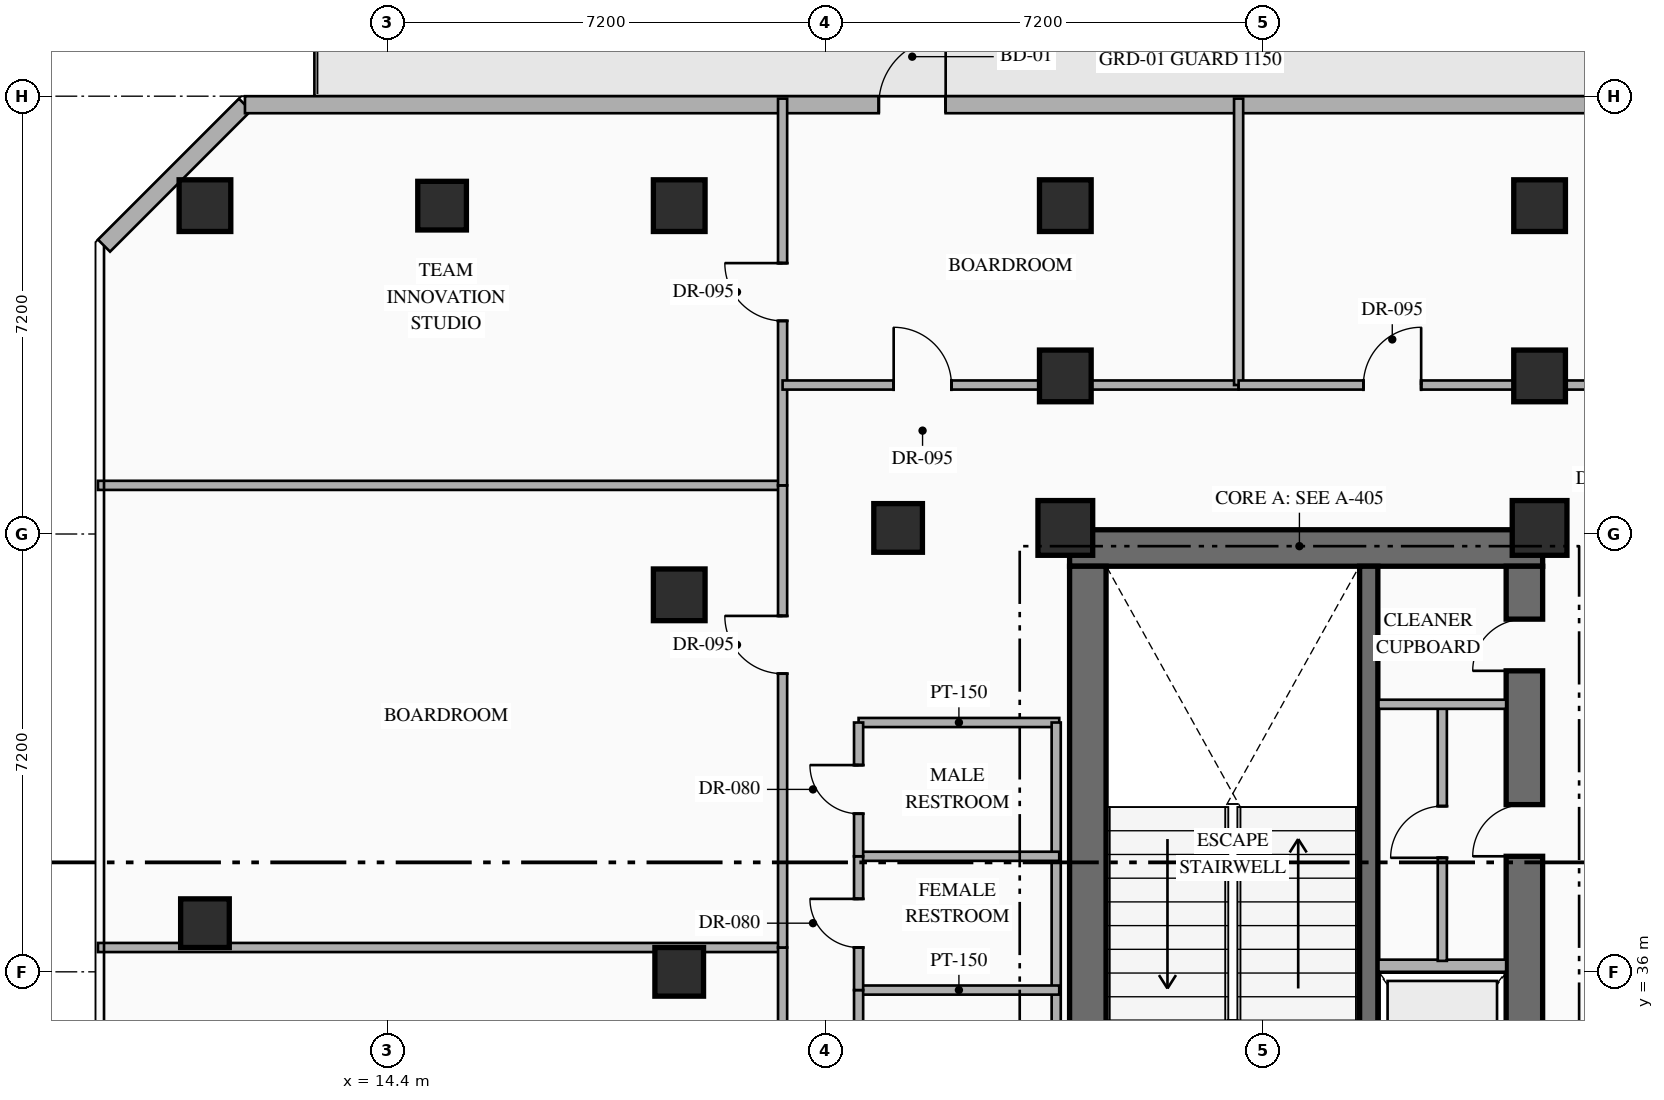
"""IFC4 building model, lengths in metres.
Left out: names, types, materials, properties, quantities, classifications, styles, units other than length and angle.
Written with IfcOpenShell. Run it as: python <this file> out.ifc"""

import sys

from ifc_helpers import new_model, si_unit, direction, frame, frame_2d, origin, origin_2d, place, context, subcontext, project, spatial, rectangle, hollow_rectangle, extrude, element, fill, save


model = new_model("IFC4")
c1 = context("Model", 3, precision=1e-05, world=origin(), true_north=direction((0.0, 1.0)))
c2 = subcontext(c1, "Body", "Model", "MODEL_VIEW")
j1 = project(units=[si_unit("LENGTHUNIT", "METRE"), si_unit("PLANEANGLEUNIT", "RADIAN")], contexts=[c1])
p1 = place(None, origin())
s1 = spatial("IfcSite", under=j1, at=p1, CompositionType="ELEMENT")
p2 = place(p1, origin())
s2 = spatial("IfcBuilding", under=s1, at=p2, CompositionType="ELEMENT")
p3 = place(p2, frame((0.0, 0.0, 142.05)))
s3 = spatial("IfcBuildingStorey", under=s2, at=p3, CompositionType="ELEMENT", Elevation=142.05)
p4 = place(p3, frame((25.62, 42.97, 0.0), z_axis=(0.0, 0.0, 1.0), x_axis=(1.0, 0.0, 0.0)))
e1 = element("IfcWall", 1, at=p4, inside=s3, PredefinedType="SHEAR", context=c2, shape_type="SweptSolid", body=[
    extrude(rectangle(XDim=7.78, YDim=0.6, at=frame_2d((3.89, 0.0))), origin(), (0.0, 0.0, 1.0), 3.6),
])
p5 = place(p3, frame((25.92, 33.19, 0.0), z_axis=(0.0, 0.0, 1.0), x_axis=(0.0, 1.0, 0.0)))
e2 = element("IfcWall", 2, at=p5, inside=s3, PredefinedType="SHEAR", context=c2, shape_type="SweptSolid", body=[
    extrude(rectangle(XDim=9.48, YDim=0.6, at=frame_2d((4.74, 0.0))), origin(), (0.0, 0.0, 1.0), 3.6),
])
p6 = place(p3, frame((33.1, 33.19, 0.0), z_axis=(0.0, 0.0, 1.0), x_axis=(0.0, 1.0, 0.0)))
e3 = element("IfcWall", 3, at=p6, inside=s3, PredefinedType="SHEAR", context=c2, shape_type="SweptSolid", body=[
    extrude(rectangle(XDim=9.48, YDim=0.6, at=frame_2d((4.74, 0.0))), origin(), (0.0, 0.0, 1.0), 3.6),
])
p7 = place(p6, frame((4.71, 0.0, 0.0)))
e4 = element("IfcOpeningElement", 4, at=p7, cuts=e3, PredefinedType="OPENING", context=c2, shape_type="SweptSolid", body=[
    extrude(rectangle(XDim=0.85, YDim=2.08, at=frame_2d((0.425, 1.04))), frame((0.0, 0.31, 0.0), z_axis=(0.0, -1.0, 0.0), x_axis=(1.0, 0.0, 0.0)), (0.0, 0.0, 1.0), 0.62),
])
p8 = place(p6, frame((7.76, 0.0, 0.0)))
e5 = element("IfcOpeningElement", 5, at=p8, cuts=e3, PredefinedType="OPENING", context=c2, shape_type="SweptSolid", body=[
    extrude(rectangle(XDim=0.85, YDim=2.08, at=frame_2d((0.425, 1.04))), frame((0.0, 0.31, 0.0), z_axis=(0.0, -1.0, 0.0), x_axis=(1.0, 0.0, 0.0)), (0.0, 0.0, 1.0), 0.62),
])
p9 = place(p3, frame((30.54, 33.19, 0.0), z_axis=(0.0, 0.0, 1.0), x_axis=(0.0, 1.0, 0.0)))
e6 = element("IfcWall", 6, at=p9, inside=s3, PredefinedType="SHEAR", context=c2, shape_type="SweptSolid", body=[
    extrude(rectangle(XDim=9.48, YDim=0.3, at=frame_2d((4.74, 0.0))), origin(), (0.0, 0.0, 1.0), 3.6),
])
for number, where, z_axis, x_axis in (
    (7, (25.55, 43.3, 0.0), (0.0, 0.0, 1.0), (1.0, 0.0, 0.0)),
    (8, (33.35, 43.3, 0.0), (0.0, 0.0, 1.0), (1.0, 0.0, 0.0)),
):
    element("IfcColumn", number, at=place(p3, frame(where, z_axis=z_axis, x_axis=x_axis)), inside=s3, PredefinedType="COLUMN", context=c2, shape_type="SweptSolid", body=[
        extrude(rectangle(XDim=0.9, YDim=0.9, at=origin_2d()), origin(), (0.0, 0.0, 1.0), 3.6),
    ])
for number, where, z_axis, x_axis in (
    (9, (25.55, 45.8, 0.0), (0.0, 0.0, 1.0), (1.0, 0.0, 0.0)),
    (10, (33.35, 45.8, 0.0), (0.0, 0.0, 1.0), (1.0, 0.0, 0.0)),
    (11, (11.4, 48.6, 0.0), (0.0, 0.0, 1.0), (1.0, 0.0, 0.0)),
    (12, (19.2, 48.6, 0.0), (0.0, 0.0, 1.0), (1.0, 0.0, 0.0)),
    (13, (25.55, 48.6, 0.0), (0.0, 0.0, 1.0), (1.0, 0.0, 0.0)),
    (14, (33.35, 48.6, 0.0), (0.0, 0.0, 1.0), (1.0, 0.0, 0.0)),
    (15, (19.2, 42.2, 0.0), (0.0, 0.0, 1.0), (1.0, 0.0, 0.0)),
):
    element("IfcColumn", number, at=place(p3, frame(where, z_axis=z_axis, x_axis=x_axis)), inside=s3, PredefinedType="COLUMN", context=c2, shape_type="SweptSolid", body=[
        extrude(hollow_rectangle(XDim=0.85, YDim=0.85, WallThickness=0.032, at=origin_2d()), origin(), (0.0, 0.0, 1.0), 3.6),
    ])
for number, where, z_axis, x_axis in (
    (16, (22.8, 43.3, 0.0), (0.0, 0.0, 1.0), (1.0, 0.0, 0.0)),
    (17, (11.4, 36.8, 0.0), (0.0, 0.0, 1.0), (1.0, 0.0, 0.0)),
    (18, (19.2, 36.0, 0.0), (0.0, 0.0, 1.0), (1.0, 0.0, 0.0)),
    (19, (15.3, 48.6, 0.0), (0.0, 0.0, 1.0), (1.0, 0.0, 0.0)),
):
    element("IfcColumn", number, at=place(p3, frame(where, z_axis=z_axis, x_axis=x_axis)), inside=s3, PredefinedType="COLUMN", context=c2, shape_type="SweptSolid", body=[
        extrude(hollow_rectangle(XDim=0.8, YDim=0.8, WallThickness=0.032, at=origin_2d()), origin(), (0.0, 0.0, 1.0), 3.6),
    ])
p10 = place(p3, frame((9.74, 47.942, 0.0), z_axis=(0.0, 0.0, 1.0), x_axis=(0.707106781187, 0.707106781187, 0.0)))
e20 = element("IfcWall", 20, at=p10, inside=s3, PredefinedType="STANDARD", context=c2, shape_type="SweptSolid", body=[
    extrude(rectangle(XDim=3.278, YDim=0.28, at=frame_2d((1.639, 0.0))), origin(), (0.0, 0.0, 1.0), 3.35),
])
p11 = place(p3, frame((12.058, 50.26, 0.0), z_axis=(0.0, 0.0, 1.0), x_axis=(1.0, 0.0, 0.0)))
e21 = element("IfcWall", 21, at=p11, inside=s3, PredefinedType="STANDARD", context=c2, shape_type="SweptSolid", body=[
    extrude(rectangle(XDim=30.484, YDim=0.28, at=frame_2d((15.242, 0.0))), origin(), (0.0, 0.0, 1.0), 3.35),
])
p12 = place(p11, frame((10.424, 0.0, 0.0)))
e22 = element("IfcOpeningElement", 22, at=p12, cuts=e21, PredefinedType="OPENING", context=c2, shape_type="SweptSolid", body=[
    extrude(rectangle(XDim=1.1, YDim=2.2, at=frame_2d((0.55, 1.1))), frame((0.0, 0.15, 0.0), z_axis=(0.0, -1.0, 0.0), x_axis=(1.0, 0.0, 0.0)), (0.0, 0.0, 1.0), 0.3),
])
p13 = place(p3, frame((30.7, 36.1, 0.0), z_axis=(0.0, 0.0, 1.0), x_axis=(1.0, 0.0, 0.0)))
e23 = element("IfcWall", 23, at=p13, inside=s3, PredefinedType="STANDARD", context=c2, shape_type="SweptSolid", body=[
    extrude(rectangle(XDim=2.1, YDim=0.2, at=frame_2d((1.05, 0.0))), origin(), (0.0, 0.0, 1.0), 3.35),
])
p14 = place(p3, frame((31.75, 36.18, 0.0), z_axis=(0.0, 0.0, 1.0), x_axis=(0.0, 1.0, 0.0)))
e24 = element("IfcWall", 24, at=p14, inside=s3, PredefinedType="PARTITIONING", context=c2, shape_type="SweptSolid", body=[
    extrude(rectangle(XDim=4.24, YDim=0.15, at=frame_2d((2.12, 0.0))), origin(), (0.0, 0.0, 1.0), 3.35),
])
p15 = place(p14, frame((1.695, 0.0, 0.0)))
e25 = element("IfcOpeningElement", 25, at=p15, cuts=e24, PredefinedType="OPENING", context=c2, shape_type="SweptSolid", body=[
    extrude(rectangle(XDim=0.85, YDim=2.08, at=frame_2d((0.425, 1.04))), frame((0.0, 0.085, 0.0), z_axis=(0.0, -1.0, 0.0), x_axis=(1.0, 0.0, 0.0)), (0.0, 0.0, 1.0), 0.17),
])
p16 = place(p3, frame((30.7, 40.4, 0.0), z_axis=(0.0, 0.0, 1.0), x_axis=(1.0, 0.0, 0.0)))
e26 = element("IfcWall", 26, at=p16, inside=s3, PredefinedType="PARTITIONING", context=c2, shape_type="SweptSolid", body=[
    extrude(rectangle(XDim=2.1, YDim=0.15, at=frame_2d((1.05, 0.0))), origin(), (0.0, 0.0, 1.0), 3.35),
])
p17 = place(p3, frame((22.15, 40.1, 0.0), z_axis=(0.0, 0.0, 1.0), x_axis=(1.0, 0.0, 0.0)))
e27 = element("IfcWall", 27, at=p17, inside=s3, PredefinedType="PARTITIONING", context=c2, shape_type="SweptSolid", body=[
    extrude(rectangle(XDim=3.3, YDim=0.15, at=frame_2d((1.65, 0.0))), origin(), (0.0, 0.0, 1.0), 3.35),
])
p18 = place(p3, frame((25.4, 33.5, 0.0), z_axis=(0.0, 0.0, 1.0), x_axis=(0.0, 1.0, 0.0)))
e28 = element("IfcWall", 28, at=p18, inside=s3, PredefinedType="PARTITIONING", context=c2, shape_type="SweptSolid", body=[
    extrude(rectangle(XDim=6.6, YDim=0.15, at=frame_2d((3.3, 0.0))), origin(), (0.0, 0.0, 1.0), 3.35),
])
for number, where, z_axis, x_axis in (
    (29, (22.15, 35.7, 0.0), (0.0, 0.0, 1.0), (1.0, 0.0, 0.0)),
    (30, (22.15, 37.9, 0.0), (0.0, 0.0, 1.0), (1.0, 0.0, 0.0)),
):
    element("IfcWall", number, at=place(p3, frame(where, z_axis=z_axis, x_axis=x_axis)), inside=s3, PredefinedType="PARTITIONING", context=c2, shape_type="SweptSolid", body=[
        extrude(rectangle(XDim=3.3, YDim=0.15, at=frame_2d((1.65, 0.0))), origin(), (0.0, 0.0, 1.0), 3.35),
    ])
p19 = place(p3, frame((22.15, 33.5, 0.0), z_axis=(0.0, 0.0, 1.0), x_axis=(0.0, 1.0, 0.0)))
e31 = element("IfcWall", 31, at=p19, inside=s3, PredefinedType="PARTITIONING", context=c2, shape_type="SweptSolid", body=[
    extrude(rectangle(XDim=2.2, YDim=0.15, at=frame_2d((1.1, 0.0))), origin(), (0.0, 0.0, 1.0), 3.35),
])
p20 = place(p19, frame((0.7, 0.0, 0.0)))
e32 = element("IfcOpeningElement", 32, at=p20, cuts=e31, PredefinedType="OPENING", context=c2, shape_type="SweptSolid", body=[
    extrude(rectangle(XDim=0.8, YDim=2.06, at=frame_2d((0.4, 1.03))), frame((0.0, 0.085, 0.0), z_axis=(0.0, -1.0, 0.0), x_axis=(1.0, 0.0, 0.0)), (0.0, 0.0, 1.0), 0.17),
])
p21 = place(p3, frame((22.15, 35.7, 0.0), z_axis=(0.0, 0.0, 1.0), x_axis=(0.0, 1.0, 0.0)))
e33 = element("IfcWall", 33, at=p21, inside=s3, PredefinedType="PARTITIONING", context=c2, shape_type="SweptSolid", body=[
    extrude(rectangle(XDim=2.2, YDim=0.15, at=frame_2d((1.1, 0.0))), origin(), (0.0, 0.0, 1.0), 3.35),
])
p22 = place(p21, frame((0.7, 0.0, 0.0)))
e34 = element("IfcOpeningElement", 34, at=p22, cuts=e33, PredefinedType="OPENING", context=c2, shape_type="SweptSolid", body=[
    extrude(rectangle(XDim=0.8, YDim=2.06, at=frame_2d((0.4, 1.03))), frame((0.0, 0.085, 0.0), z_axis=(0.0, -1.0, 0.0), x_axis=(1.0, 0.0, 0.0)), (0.0, 0.0, 1.0), 0.17),
])
p23 = place(p3, frame((22.15, 37.9, 0.0), z_axis=(0.0, 0.0, 1.0), x_axis=(0.0, 1.0, 0.0)))
e35 = element("IfcWall", 35, at=p23, inside=s3, PredefinedType="PARTITIONING", context=c2, shape_type="SweptSolid", body=[
    extrude(rectangle(XDim=2.2, YDim=0.15, at=frame_2d((1.1, 0.0))), origin(), (0.0, 0.0, 1.0), 3.35),
])
p24 = place(p23, frame((0.7, 0.0, 0.0)))
e36 = element("IfcOpeningElement", 36, at=p24, cuts=e35, PredefinedType="OPENING", context=c2, shape_type="SweptSolid", body=[
    extrude(rectangle(XDim=0.8, YDim=2.06, at=frame_2d((0.4, 1.03))), frame((0.0, 0.085, 0.0), z_axis=(0.0, -1.0, 0.0), x_axis=(1.0, 0.0, 0.0)), (0.0, 0.0, 1.0), 0.17),
])
p25 = place(p3, frame((9.64, 36.4, 0.0), z_axis=(0.0, 0.0, 1.0), x_axis=(1.0, 0.0, 0.0)))
e37 = element("IfcWall", 37, at=p25, inside=s3, PredefinedType="PARTITIONING", context=c2, shape_type="SweptSolid", body=[
    extrude(rectangle(XDim=11.26, YDim=0.15, at=frame_2d((5.63, 0.0))), origin(), (0.0, 0.0, 1.0), 2.695),
])
p26 = place(p3, frame((20.9, 28.8, 0.0), z_axis=(0.0, 0.0, 1.0), x_axis=(0.0, 1.0, 0.0)))
e38 = element("IfcWall", 38, at=p26, inside=s3, PredefinedType="PARTITIONING", context=c2, shape_type="SweptSolid", body=[
    extrude(rectangle(XDim=7.6, YDim=0.15, at=frame_2d((3.8, 0.0))), origin(), (0.0, 0.0, 1.0), 3.35),
])
p27 = place(p26, frame((3.03, 0.0, 0.0)))
e39 = element("IfcOpeningElement", 39, at=p27, cuts=e38, PredefinedType="OPENING", context=c2, shape_type="SweptSolid", body=[
    extrude(rectangle(XDim=0.95, YDim=2.15, at=frame_2d((0.475, 1.075))), frame((0.0, 0.085, 0.0), z_axis=(0.0, -1.0, 0.0), x_axis=(1.0, 0.0, 0.0)), (0.0, 0.0, 1.0), 0.17),
])
p28 = place(p3, frame((9.64, 44.0, 0.0), z_axis=(0.0, 0.0, 1.0), x_axis=(1.0, 0.0, 0.0)))
e40 = element("IfcWall", 40, at=p28, inside=s3, PredefinedType="PARTITIONING", context=c2, shape_type="SweptSolid", body=[
    extrude(rectangle(XDim=11.26, YDim=0.15, at=frame_2d((5.63, 0.0))), origin(), (0.0, 0.0, 1.0), 3.35),
])
p29 = place(p3, frame((20.9, 36.4, 0.0), z_axis=(0.0, 0.0, 1.0), x_axis=(0.0, 1.0, 0.0)))
e41 = element("IfcWall", 41, at=p29, inside=s3, PredefinedType="PARTITIONING", context=c2, shape_type="SweptSolid", body=[
    extrude(rectangle(XDim=7.6, YDim=0.15, at=frame_2d((3.8, 0.0))), origin(), (0.0, 0.0, 1.0), 3.35),
])
p30 = place(p29, frame((4.503, 0.0, 0.0)))
e42 = element("IfcOpeningElement", 42, at=p30, cuts=e41, PredefinedType="OPENING", context=c2, shape_type="SweptSolid", body=[
    extrude(rectangle(XDim=0.95, YDim=2.15, at=frame_2d((0.475, 1.075))), frame((0.0, 0.085, 0.0), z_axis=(0.0, -1.0, 0.0), x_axis=(1.0, 0.0, 0.0)), (0.0, 0.0, 1.0), 0.17),
])
p31 = place(p3, frame((20.9, 44.0, 0.0), z_axis=(0.0, 0.0, 1.0), x_axis=(0.0, 1.0, 0.0)))
e43 = element("IfcWall", 43, at=p31, inside=s3, PredefinedType="PARTITIONING", context=c2, shape_type="SweptSolid", body=[
    extrude(rectangle(XDim=6.36, YDim=0.15, at=frame_2d((3.18, 0.0))), origin(), (0.0, 0.0, 1.0), 3.35),
])
p32 = place(p31, frame((2.705, 0.0, 0.0)))
e44 = element("IfcOpeningElement", 44, at=p32, cuts=e43, PredefinedType="OPENING", context=c2, shape_type="SweptSolid", body=[
    extrude(rectangle(XDim=0.95, YDim=2.15, at=frame_2d((0.475, 1.075))), frame((0.0, 0.085, 0.0), z_axis=(0.0, -1.0, 0.0), x_axis=(1.0, 0.0, 0.0)), (0.0, 0.0, 1.0), 0.17),
])
p33 = place(p3, frame((20.9, 45.65, 0.0), z_axis=(0.0, 0.0, 1.0), x_axis=(1.0, 0.0, 0.0)))
e45 = element("IfcWall", 45, at=p33, inside=s3, PredefinedType="PARTITIONING", context=c2, shape_type="SweptSolid", body=[
    extrude(rectangle(XDim=7.5, YDim=0.15, at=frame_2d((3.75, 0.0))), origin(), (0.0, 0.0, 1.0), 2.695),
])
p34 = place(p33, frame((1.827, 0.0, 0.0)))
e46 = element("IfcOpeningElement", 46, at=p34, cuts=e45, PredefinedType="OPENING", context=c2, shape_type="SweptSolid", body=[
    extrude(rectangle(XDim=0.95, YDim=2.15, at=frame_2d((0.475, 1.075))), frame((0.0, 0.085, 0.0), z_axis=(0.0, -1.0, 0.0), x_axis=(1.0, 0.0, 0.0)), (0.0, 0.0, 1.0), 0.17),
])
p35 = place(p3, frame((28.4, 45.65, 0.0), z_axis=(0.0, 0.0, 1.0), x_axis=(0.0, 1.0, 0.0)))
e47 = element("IfcWall", 47, at=p35, inside=s3, PredefinedType="PARTITIONING", context=c2, shape_type="SweptSolid", body=[
    extrude(rectangle(XDim=4.71, YDim=0.15, at=frame_2d((2.355, 0.0))), origin(), (0.0, 0.0, 1.0), 3.35),
])
p36 = place(p3, frame((28.4, 45.65, 0.0), z_axis=(0.0, 0.0, 1.0), x_axis=(1.0, 0.0, 0.0)))
e48 = element("IfcWall", 48, at=p36, inside=s3, PredefinedType="PARTITIONING", context=c2, shape_type="SweptSolid", body=[
    extrude(rectangle(XDim=8.4, YDim=0.15, at=frame_2d((4.2, 0.0))), origin(), (0.0, 0.0, 1.0), 2.695),
])
p37 = place(p36, frame((2.052, 0.0, 0.0)))
e49 = element("IfcOpeningElement", 49, at=p37, cuts=e48, PredefinedType="OPENING", context=c2, shape_type="SweptSolid", body=[
    extrude(rectangle(XDim=0.95, YDim=2.15, at=frame_2d((0.475, 1.075))), frame((0.0, 0.085, 0.0), z_axis=(0.0, -1.0, 0.0), x_axis=(1.0, 0.0, 0.0)), (0.0, 0.0, 1.0), 0.17),
])
p38 = place(p12, origin())
e50 = element("IfcDoor", 50, at=p38, inside=s3, OperationType="SINGLE_SWING_RIGHT", PredefinedType="DOOR", context=c2, shape_type="SweptSolid", body=[
    extrude(rectangle(XDim=1.1, YDim=2.2, at=frame_2d((0.55, 1.1))), frame((0.0, 0.025, 0.0), z_axis=(0.0, -1.0, 0.0), x_axis=(1.0, 0.0, 0.0)), (0.0, 0.0, 1.0), 0.05),
])
fill(e22, e50)
p39 = place(p7, origin())
e51 = element("IfcDoor", 51, at=p39, inside=s3, OperationType="SINGLE_SWING_LEFT", PredefinedType="DOOR", context=c2, shape_type="SweptSolid", body=[
    extrude(rectangle(XDim=0.85, YDim=2.08, at=frame_2d((0.425, 1.04))), frame((0.0, 0.025, 0.0), z_axis=(0.0, -1.0, 0.0), x_axis=(1.0, 0.0, 0.0)), (0.0, 0.0, 1.0), 0.05),
])
fill(e4, e51)
p40 = place(p8, origin())
e52 = element("IfcDoor", 52, at=p40, inside=s3, OperationType="SINGLE_SWING_LEFT", PredefinedType="DOOR", context=c2, shape_type="SweptSolid", body=[
    extrude(rectangle(XDim=0.85, YDim=2.08, at=frame_2d((0.425, 1.04))), frame((0.0, 0.025, 0.0), z_axis=(0.0, -1.0, 0.0), x_axis=(1.0, 0.0, 0.0)), (0.0, 0.0, 1.0), 0.05),
])
fill(e5, e52)
p41 = place(p15, origin())
e53 = element("IfcDoor", 53, at=p41, inside=s3, OperationType="SINGLE_SWING_LEFT", PredefinedType="DOOR", context=c2, shape_type="SweptSolid", body=[
    extrude(rectangle(XDim=0.85, YDim=2.08, at=frame_2d((0.425, 1.04))), frame((0.0, 0.025, 0.0), z_axis=(0.0, -1.0, 0.0), x_axis=(1.0, 0.0, 0.0)), (0.0, 0.0, 1.0), 0.05),
])
fill(e25, e53)
p42 = place(p22, origin())
e54 = element("IfcDoor", 54, at=p42, inside=s3, OperationType="SINGLE_SWING_RIGHT", PredefinedType="DOOR", context=c2, shape_type="SweptSolid", body=[
    extrude(rectangle(XDim=0.8, YDim=2.06, at=frame_2d((0.4, 1.03))), frame((0.0, 0.025, 0.0), z_axis=(0.0, -1.0, 0.0), x_axis=(1.0, 0.0, 0.0)), (0.0, 0.0, 1.0), 0.05),
])
fill(e34, e54)
p43 = place(p24, origin())
e55 = element("IfcDoor", 55, at=p43, inside=s3, OperationType="SINGLE_SWING_RIGHT", PredefinedType="DOOR", context=c2, shape_type="SweptSolid", body=[
    extrude(rectangle(XDim=0.8, YDim=2.06, at=frame_2d((0.4, 1.03))), frame((0.0, 0.025, 0.0), z_axis=(0.0, -1.0, 0.0), x_axis=(1.0, 0.0, 0.0)), (0.0, 0.0, 1.0), 0.05),
])
fill(e36, e55)
p44 = place(p30, origin())
e56 = element("IfcDoor", 56, at=p44, inside=s3, OperationType="SINGLE_SWING_RIGHT", PredefinedType="DOOR", context=c2, shape_type="SweptSolid", body=[
    extrude(rectangle(XDim=0.95, YDim=2.15, at=frame_2d((0.475, 1.075))), frame((0.0, 0.025, 0.0), z_axis=(0.0, -1.0, 0.0), x_axis=(1.0, 0.0, 0.0)), (0.0, 0.0, 1.0), 0.05),
])
fill(e42, e56)
p45 = place(p32, origin())
e57 = element("IfcDoor", 57, at=p45, inside=s3, OperationType="SINGLE_SWING_RIGHT", PredefinedType="DOOR", context=c2, shape_type="SweptSolid", body=[
    extrude(rectangle(XDim=0.95, YDim=2.15, at=frame_2d((0.475, 1.075))), frame((0.0, 0.025, 0.0), z_axis=(0.0, -1.0, 0.0), x_axis=(1.0, 0.0, 0.0)), (0.0, 0.0, 1.0), 0.05),
])
fill(e44, e57)
p46 = place(p34, origin())
e58 = element("IfcDoor", 58, at=p46, inside=s3, OperationType="SINGLE_SWING_LEFT", PredefinedType="DOOR", context=c2, shape_type="SweptSolid", body=[
    extrude(rectangle(XDim=0.95, YDim=2.15, at=frame_2d((0.475, 1.075))), frame((0.0, 0.025, 0.0), z_axis=(0.0, -1.0, 0.0), x_axis=(1.0, 0.0, 0.0)), (0.0, 0.0, 1.0), 0.05),
])
fill(e46, e58)
p47 = place(p37, origin())
e59 = element("IfcDoor", 59, at=p47, inside=s3, OperationType="SINGLE_SWING_RIGHT", PredefinedType="DOOR", context=c2, shape_type="SweptSolid", body=[
    extrude(rectangle(XDim=0.95, YDim=2.15, at=frame_2d((0.475, 1.075))), frame((0.0, 0.025, 0.0), z_axis=(0.0, -1.0, 0.0), x_axis=(1.0, 0.0, 0.0)), (0.0, 0.0, 1.0), 0.05),
])
fill(e49, e59)
save(model, sys.argv[1])
